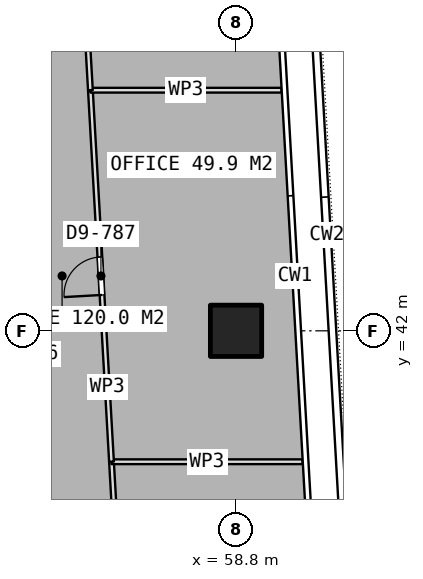
"""IFC4 building model, lengths in metres.
Left out: names, types, materials, properties, quantities, classifications, styles, units other than length and angle.
Written with IfcOpenShell. Run it as: python <this file> out.ifc"""

import sys

from ifc_helpers import new_model, si_unit, direction, frame, frame_2d, origin, origin_2d, place, context, subcontext, project, spatial, rectangle, extrude, element, fill, save


model = new_model("IFC4")
c1 = context("Model", 3, precision=1e-05, world=origin(), true_north=direction((0.0, 1.0)))
c2 = subcontext(c1, "Body", "Model", "MODEL_VIEW")
j1 = project(units=[si_unit("LENGTHUNIT", "METRE"), si_unit("PLANEANGLEUNIT", "RADIAN")], contexts=[c1])
p1 = place(None, origin())
s1 = spatial("IfcSite", under=j1, at=p1, CompositionType="ELEMENT")
p2 = place(p1, origin())
s2 = spatial("IfcBuilding", under=s1, at=p2, CompositionType="ELEMENT")
p3 = place(p2, frame((0.0, 0.0, 195.2)))
s3 = spatial("IfcBuildingStorey", under=s2, at=p3, CompositionType="ELEMENT", Elevation=195.2)
p4 = place(p3, frame((58.8, 42.0, 0.0), z_axis=(0.0, 0.0, 1.0), x_axis=(1.0, 0.0, 0.0)))
e1 = element("IfcColumn", 1, at=p4, inside=s3, PredefinedType="COLUMN", context=c2, shape_type="SweptSolid", body=[
    extrude(rectangle(XDim=1.35, YDim=1.35, at=origin_2d()), origin(), (0.0, 0.0, 1.0), 3.75),
])
p5 = place(p3, frame((56.067, 28.972, 0.0), z_axis=(0.0, 0.0, 1.0), x_axis=(-0.056670220537, 0.99839295175, 0.0)))
e2 = element("IfcWall", 2, at=p5, inside=s3, PredefinedType="PARTITIONING", context=c2, shape_type="SweptSolid", body=[
    extrude(rectangle(XDim=9.598, YDim=0.125, at=frame_2d((4.799, 0.0))), origin(), (0.0, 0.0, 1.0), 3.5),
])
p6 = place(p5, frame((4.299, 0.0, 0.0)))
e3 = element("IfcOpeningElement", 3, at=p6, cuts=e2, PredefinedType="OPENING", context=c2, shape_type="SweptSolid", body=[
    extrude(rectangle(XDim=1.0, YDim=2.1, at=frame_2d((0.5, 1.05))), frame((0.0, 0.073, 0.0), z_axis=(0.0, -1.0, 0.0), x_axis=(1.0, 0.0, 0.0)), (0.0, 0.0, 1.0), 0.145),
])
p7 = place(p3, frame((55.523, 38.555, 0.0), z_axis=(0.0, 0.0, 1.0), x_axis=(1.0, 0.0, 0.0)))
e4 = element("IfcWall", 4, at=p7, inside=s3, PredefinedType="PARTITIONING", context=c2, shape_type="SweptSolid", body=[
    extrude(rectangle(XDim=5.028, YDim=0.125, at=frame_2d((2.514, 0.0))), origin(), (0.0, 0.0, 1.0), 3.5),
])
p8 = place(p3, frame((55.523, 38.556, 0.0), z_axis=(0.0, 0.0, 1.0), x_axis=(-0.056678391694, 0.99839248791, 0.0)))
e5 = element("IfcWall", 5, at=p8, inside=s3, PredefinedType="PARTITIONING", context=c2, shape_type="SweptSolid", body=[
    extrude(rectangle(XDim=9.791, YDim=0.125, at=frame_2d((4.896, 0.0))), origin(), (0.0, 0.0, 1.0), 3.5),
])
p9 = place(p8, frame((4.395, 0.0, 0.0)))
e6 = element("IfcOpeningElement", 6, at=p9, cuts=e5, PredefinedType="OPENING", context=c2, shape_type="SweptSolid", body=[
    extrude(rectangle(XDim=1.0, YDim=2.1, at=frame_2d((0.5, 1.05))), frame((0.0, 0.073, 0.0), z_axis=(0.0, -1.0, 0.0), x_axis=(1.0, 0.0, 0.0)), (0.0, 0.0, 1.0), 0.145),
])
p10 = place(p3, frame((54.968, 48.331, 0.0), z_axis=(0.0, 0.0, 1.0), x_axis=(1.0, 0.0, 0.0)))
e7 = element("IfcWall", 7, at=p10, inside=s3, PredefinedType="PARTITIONING", context=c2, shape_type="SweptSolid", body=[
    extrude(rectangle(XDim=5.028, YDim=0.125, at=frame_2d((2.514, 0.0))), origin(), (0.0, 0.0, 1.0), 3.5),
])
p11 = place(p3, frame((54.968, 48.332, 0.0), z_axis=(0.0, 0.0, 1.0), x_axis=(-0.056680388523, 0.998392374549, 0.0)))
e8 = element("IfcWall", 8, at=p11, inside=s3, PredefinedType="PARTITIONING", context=c2, shape_type="SweptSolid", body=[
    extrude(rectangle(XDim=7.585, YDim=0.125, at=frame_2d((3.792, 0.0))), origin(), (0.0, 0.0, 1.0), 3.5),
])
p12 = place(p11, frame((2.893, 0.0, 0.0)))
e9 = element("IfcOpeningElement", 9, at=p12, cuts=e8, PredefinedType="OPENING", context=c2, shape_type="SweptSolid", body=[
    extrude(rectangle(XDim=1.8, YDim=2.1, at=frame_2d((0.9, 1.05))), frame((0.0, 0.073, 0.0), z_axis=(0.0, -1.0, 0.0), x_axis=(1.0, 0.0, 0.0)), (0.0, 0.0, 1.0), 0.145),
])
p13 = place(p9, origin())
e10 = element("IfcDoor", 10, at=p13, inside=s3, OperationType="SINGLE_SWING_LEFT", PredefinedType="DOOR", context=c2, shape_type="SweptSolid", body=[
    extrude(rectangle(XDim=1.0, YDim=2.1, at=frame_2d((0.5, 1.05))), frame((0.0, 0.025, 0.0), z_axis=(0.0, -1.0, 0.0), x_axis=(1.0, 0.0, 0.0)), (0.0, 0.0, 1.0), 0.05),
])
fill(e6, e10)
save(model, sys.argv[1])
